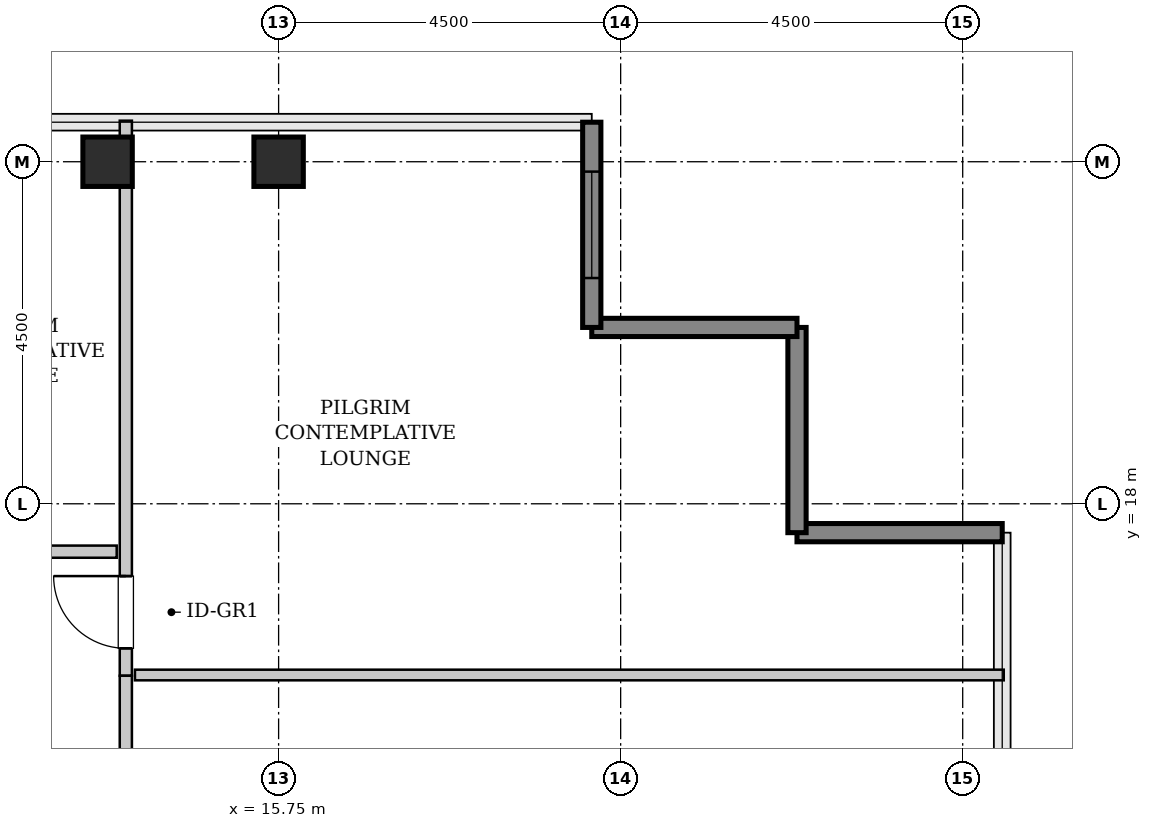
"""IFC4 building model, lengths in metres.
Left out: names, types, materials, properties, quantities, classifications, styles, units other than length and angle.
Written with IfcOpenShell. Run it as: python <this file> out.ifc"""

import sys

from ifc_helpers import new_model, si_unit, direction, frame, frame_2d, origin, origin_2d, place, context, subcontext, project, spatial, rectangle, hollow_rectangle, extrude, source, transform, mapped, element, fill, save


model = new_model("IFC4")
c1 = context("Model", 3, precision=1e-05, world=origin(), true_north=direction((0.0, 1.0)))
c2 = subcontext(c1, "Body", "Model", "MODEL_VIEW")
j1 = project(units=[si_unit("LENGTHUNIT", "METRE"), si_unit("PLANEANGLEUNIT", "RADIAN")], contexts=[c1])
p1 = place(None, origin())
s1 = spatial("IfcSite", under=j1, at=p1, CompositionType="ELEMENT")
p2 = place(p1, origin())
s2 = spatial("IfcBuilding", under=s1, at=p2, CompositionType="ELEMENT")
p3 = place(p2, frame((0.0, 0.0, 244.6)))
s3 = spatial("IfcBuildingStorey", under=s2, at=p3, CompositionType="ELEMENT", Elevation=244.6)
m1 = source(origin(), c2, "Body", "SweptSolid", [
    extrude(hollow_rectangle(XDim=0.65, YDim=0.65, WallThickness=0.032, InnerFilletRadius=0.032, OuterFilletRadius=0.064, at=origin_2d()), origin(), (0.0, 0.0, 1.0), 3.8),
])
for number, where, z_axis, x_axis in (
    (1, (13.5, 22.5, 0.0), (0.0, 0.0, 1.0), (1.0, 0.0, 0.0)),
    (2, (15.75, 22.5, 0.0), (0.0, 0.0, 1.0), (1.0, 0.0, 0.0)),
):
    element("IfcColumn", number, at=place(p3, frame(where, z_axis=z_axis, x_axis=x_axis)), inside=s3, PredefinedType="COLUMN", context=c2, shape_type="MappedRepresentation", body=[
        mapped(m1, transform((0.0, 0.0, 0.0), x_axis=(1.0, 0.0, 0.0), y_axis=(0.0, 1.0, 0.0), z_axis=(0.0, 0.0, 1.0), scale=1.0)),
    ])
m2 = source(origin(), c2, "Body", "SweptSolid", [
    extrude(rectangle(XDim=2.7, YDim=0.24, at=frame_2d((1.35, 0.0))), origin(), (0.0, 0.0, 1.0), 3.55),
])
for number, where, z_axis, x_axis in (
    (3, (25.27, 17.62, 0.0), (0.0, 0.0, 1.0), (-1.0, 0.0, 0.0)),
    (4, (22.57, 17.62, 0.0), (0.0, 0.0, 1.0), (0.0, 1.0, 0.0)),
    (5, (22.57, 20.32, 0.0), (0.0, 0.0, 1.0), (-1.0, 0.0, 0.0)),
):
    element("IfcWall", number, at=place(p3, frame(where, z_axis=z_axis, x_axis=x_axis)), inside=s3, PredefinedType="SHEAR", context=c2, shape_type="MappedRepresentation", body=[
        mapped(m2, transform((0.0, 0.0, 0.0), x_axis=(1.0, 0.0, 0.0), y_axis=(0.0, 1.0, 0.0), z_axis=(0.0, 0.0, 1.0), scale=1.0)),
    ])
p4 = place(p3, frame((19.87, 20.32, 0.0), z_axis=(0.0, 0.0, 1.0), x_axis=(0.0, 1.0, 0.0)))
e6 = element("IfcWall", 6, at=p4, inside=s3, PredefinedType="SHEAR", context=c2, shape_type="MappedRepresentation", body=[
    mapped(m2, transform((0.0, 0.0, 0.0), x_axis=(1.0, 0.0, 0.0), y_axis=(0.0, 1.0, 0.0), z_axis=(0.0, 0.0, 1.0), scale=1.0)),
])
p5 = place(p4, frame((0.65, 0.0, 0.85)))
e7 = element("IfcOpeningElement", 7, at=p5, cuts=e6, PredefinedType="OPENING", context=c2, shape_type="SweptSolid", body=[
    extrude(rectangle(XDim=1.4, YDim=1.8, at=frame_2d((0.7, 0.9))), frame((0.0, 0.13, 0.0), z_axis=(0.0, -1.0, 0.0), x_axis=(1.0, 0.0, 0.0)), (0.0, 0.0, 1.0), 0.26),
])
m3 = source(origin(), c2, "Body", "SweptSolid", [
    extrude(rectangle(XDim=7.302, YDim=0.16, at=frame_2d((3.651, 0.0))), origin(), (0.0, 0.0, 1.0), 3.535),
])
p6 = place(p3, frame((13.74, 15.738, 0.0), z_axis=(0.0, 0.0, 1.0), x_axis=(0.0, 1.0, 0.0)))
e8 = element("IfcWall", 8, at=p6, inside=s3, PredefinedType="PARTITIONING", context=c2, shape_type="MappedRepresentation", body=[
    mapped(m3, transform((0.0, 0.0, 0.0), x_axis=(1.0, 0.0, 0.0), y_axis=(0.0, 1.0, 0.0), z_axis=(0.0, 0.0, 1.0), scale=1.0)),
])
p7 = place(p6, frame((0.361, 0.0, 0.0)))
e9 = element("IfcOpeningElement", 9, at=p7, cuts=e8, PredefinedType="OPENING", context=c2, shape_type="SweptSolid", body=[
    extrude(rectangle(XDim=0.95, YDim=2.1, at=frame_2d((0.475, 1.05))), frame((0.0, 0.09, 0.0), z_axis=(0.0, -1.0, 0.0), x_axis=(1.0, 0.0, 0.0)), (0.0, 0.0, 1.0), 0.18),
])
m4 = source(origin(), c2, "Body", "SweptSolid", [
    extrude(rectangle(XDim=11.43, YDim=0.14, at=frame_2d((5.715, 0.0))), origin(), (0.0, 0.0, 1.0), 3.535),
])
p8 = place(p3, frame((13.86, 15.748, 0.0), z_axis=(0.0, 0.0, 1.0), x_axis=(1.0, 0.0, 0.0)))
e10 = element("IfcWall", 10, at=p8, inside=s3, PredefinedType="PARTITIONING", context=c2, shape_type="MappedRepresentation", body=[
    mapped(m4, transform((0.0, 0.0, 0.0), x_axis=(1.0, 0.0, 0.0), y_axis=(0.0, 1.0, 0.0), z_axis=(0.0, 0.0, 1.0), scale=1.0)),
])
m5 = source(origin(), c2, "Body", "SweptSolid", [
    extrude(rectangle(XDim=7.242, YDim=0.16, at=frame_2d((3.621, 0.0))), origin(), (0.0, 0.0, 1.0), 3.535),
])
p9 = place(p3, frame((13.74, 8.495, 0.0), z_axis=(0.0, 0.0, 1.0), x_axis=(0.0, 1.0, 0.0)))
e11 = element("IfcWall", 11, at=p9, inside=s3, PredefinedType="PARTITIONING", context=c2, shape_type="MappedRepresentation", body=[
    mapped(m5, transform((0.0, 0.0, 0.0), x_axis=(1.0, 0.0, 0.0), y_axis=(0.0, 1.0, 0.0), z_axis=(0.0, 0.0, 1.0), scale=1.0)),
])
p10 = place(p9, frame((3.146, 0.0, 0.0)))
e12 = element("IfcOpeningElement", 12, at=p10, cuts=e11, PredefinedType="OPENING", context=c2, shape_type="SweptSolid", body=[
    extrude(rectangle(XDim=0.95, YDim=2.1, at=frame_2d((0.475, 1.05))), frame((0.0, 0.09, 0.0), z_axis=(0.0, -1.0, 0.0), x_axis=(1.0, 0.0, 0.0)), (0.0, 0.0, 1.0), 0.18),
])
m6 = source(origin(), c2, "Body", "SweptSolid", [
    extrude(rectangle(XDim=5.225, YDim=0.16, at=frame_2d((2.613, 0.0))), origin(), (0.0, 0.0, 1.0), 3.535),
])
p11 = place(p3, frame((8.395, 17.37, 0.0), z_axis=(0.0, 0.0, 1.0), x_axis=(1.0, 0.0, 0.0)))
e13 = element("IfcWall", 13, at=p11, inside=s3, PredefinedType="PARTITIONING", context=c2, shape_type="MappedRepresentation", body=[
    mapped(m6, transform((0.0, 0.0, 0.0), x_axis=(1.0, 0.0, 0.0), y_axis=(0.0, 1.0, 0.0), z_axis=(0.0, 0.0, 1.0), scale=1.0)),
])
p12 = place(p11, frame((1.543, 0.0, 0.0)))
e14 = element("IfcOpeningElement", 14, at=p12, cuts=e13, PredefinedType="OPENING", context=c2, shape_type="SweptSolid", body=[
    extrude(rectangle(XDim=0.95, YDim=2.1, at=frame_2d((0.475, 1.05))), frame((0.0, 0.09, 0.0), z_axis=(0.0, -1.0, 0.0), x_axis=(1.0, 0.0, 0.0)), (0.0, 0.0, 1.0), 0.18),
])
m7 = source(origin(), c2, "Body", "SweptSolid", [
    extrude(rectangle(XDim=1.4, YDim=1.8, at=frame_2d((0.7, 0.9))), frame((0.0, 0.03, 0.0), z_axis=(0.0, -1.0, 0.0), x_axis=(1.0, 0.0, 0.0)), (0.0, 0.0, 1.0), 0.06),
])
p13 = place(p5, origin())
e15 = element("IfcWindow", 15, at=p13, inside=s3, PartitioningType="SINGLE_PANEL", PredefinedType="WINDOW", context=c2, shape_type="MappedRepresentation", body=[
    mapped(m7, transform((0.0, 0.0, 0.0), x_axis=(1.0, 0.0, 0.0), y_axis=(0.0, 1.0, 0.0), z_axis=(0.0, 0.0, 1.0), scale=1.0)),
])
fill(e7, e15)
m8 = source(origin(), c2, "Body", "SweptSolid", [
    extrude(rectangle(XDim=0.95, YDim=2.1, at=frame_2d((0.475, 1.05))), frame((0.0, 0.025, 0.0), z_axis=(0.0, -1.0, 0.0), x_axis=(1.0, 0.0, 0.0)), (0.0, 0.0, 1.0), 0.05),
])
p14 = place(p7, origin())
e16 = element("IfcDoor", 16, at=p14, inside=s3, OperationType="SINGLE_SWING_RIGHT", PredefinedType="DOOR", context=c2, shape_type="MappedRepresentation", body=[
    mapped(m8, transform((0.0, 0.0, 0.0), x_axis=(1.0, 0.0, 0.0), y_axis=(0.0, 1.0, 0.0), z_axis=(0.0, 0.0, 1.0), scale=1.0)),
])
fill(e9, e16)
save(model, sys.argv[1])
